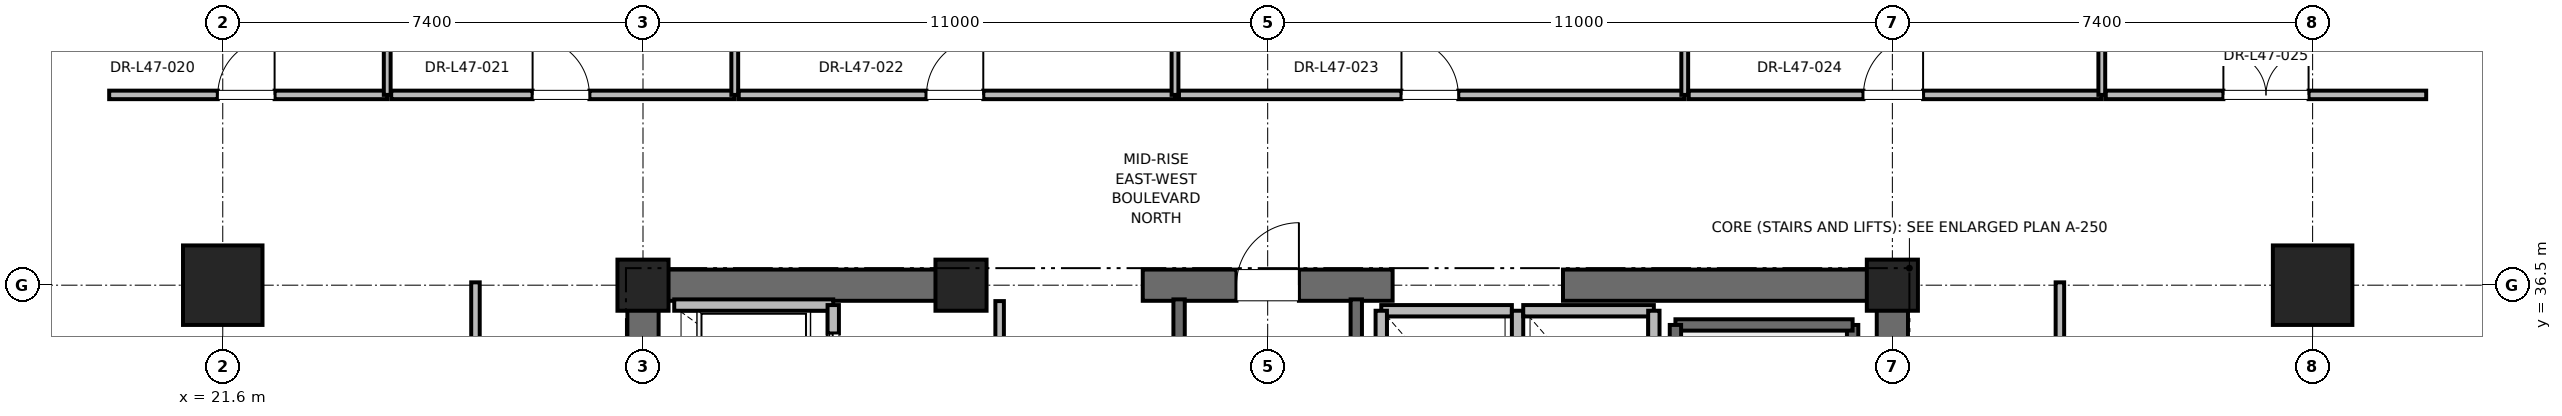
"""IFC4 building model, lengths in metres.
Left out: names, types, materials, properties, quantities, classifications, styles, units other than length and angle.
Written with IfcOpenShell. Run it as: python <this file> out.ifc"""

import sys

from ifc_helpers import new_model, si_unit, direction, frame, frame_2d, origin, origin_2d, place, context, subcontext, project, spatial, rectangle, extrude, element, fill, save


model = new_model("IFC4")
c1 = context("Model", 3, precision=1e-05, world=origin(), true_north=direction((0.0, 1.0)))
c2 = subcontext(c1, "Body", "Model", "MODEL_VIEW")
j1 = project(units=[si_unit("LENGTHUNIT", "METRE"), si_unit("PLANEANGLEUNIT", "RADIAN")], contexts=[c1])
p1 = place(None, origin())
s1 = spatial("IfcSite", under=j1, at=p1, CompositionType="ELEMENT")
p2 = place(p1, origin())
s2 = spatial("IfcBuilding", under=s1, at=p2, CompositionType="ELEMENT")
p3 = place(p2, frame((0.0, 0.0, 205.2)))
s3 = spatial("IfcBuildingStorey", under=s2, at=p3, CompositionType="ELEMENT", Elevation=205.2)
for number, where, z_axis, x_axis in (
    (1, (21.6, 36.5, 0.0), (0.0, 0.0, 1.0), (1.0, 0.0, 0.0)),
    (2, (58.4, 36.5, 0.0), (0.0, 0.0, 1.0), (1.0, 0.0, 0.0)),
):
    element("IfcColumn", number, at=place(p3, frame(where, z_axis=z_axis, x_axis=x_axis)), inside=s3, PredefinedType="COLUMN", context=c2, shape_type="SweptSolid", body=[
        extrude(rectangle(XDim=1.4, YDim=1.4, at=origin_2d()), origin(), (0.0, 0.0, 1.0), 4.0),
    ])
for number, where, z_axis, x_axis in (
    (3, (29.0, 36.5, 0.0), (0.0, 0.0, 1.0), (1.0, 0.0, 0.0)),
    (4, (51.0, 36.5, 0.0), (0.0, 0.0, 1.0), (1.0, 0.0, 0.0)),
    (5, (34.6, 36.5, 0.0), (0.0, 0.0, 1.0), (1.0, 0.0, 0.0)),
):
    element("IfcColumn", number, at=place(p3, frame(where, z_axis=z_axis, x_axis=x_axis)), inside=s3, PredefinedType="PILASTER", context=c2, shape_type="SweptSolid", body=[
        extrude(rectangle(XDim=0.9, YDim=0.9, at=origin_2d()), origin(), (0.0, 0.0, 1.0), 4.0),
    ])
p4 = place(p3, frame((29.0, 36.5, 0.0), z_axis=(0.0, 0.0, 1.0), x_axis=(1.0, 0.0, 0.0)))
e6 = element("IfcWall", 6, at=p4, inside=s3, PredefinedType="SHEAR", context=c2, shape_type="SweptSolid", body=[
    extrude(rectangle(XDim=5.8, YDim=0.55, at=frame_2d((2.9, 0.0))), origin(), (0.0, 0.0, 1.0), 3.775),
])
p5 = place(p3, frame((37.8, 36.5, 0.0), z_axis=(0.0, 0.0, 1.0), x_axis=(1.0, 0.0, 0.0)))
e7 = element("IfcWall", 7, at=p5, inside=s3, PredefinedType="SHEAR", context=c2, shape_type="SweptSolid", body=[
    extrude(rectangle(XDim=4.4, YDim=0.55, at=frame_2d((2.2, 0.0))), origin(), (0.0, 0.0, 1.0), 3.775),
])
p6 = place(p5, frame((1.65, 0.0, 0.0)))
e8 = element("IfcOpeningElement", 8, at=p6, cuts=e7, PredefinedType="OPENING", context=c2, shape_type="SweptSolid", body=[
    extrude(rectangle(XDim=1.1, YDim=2.15, at=frame_2d((0.55, 1.075))), frame((0.0, 0.275, 0.0), z_axis=(0.0, -1.0, 0.0), x_axis=(1.0, 0.0, 0.0)), (0.0, 0.0, 1.0), 0.55),
])
for number, where, z_axis, x_axis in (
    (9, (45.2, 36.5, 0.0), (0.0, 0.0, 1.0), (1.0, 0.0, 0.0)),
    (10, (29.0, 30.7, 0.0), (0.0, 0.0, 1.0), (0.0, 1.0, 0.0)),
):
    element("IfcWall", number, at=place(p3, frame(where, z_axis=z_axis, x_axis=x_axis)), inside=s3, PredefinedType="SHEAR", context=c2, shape_type="SweptSolid", body=[
        extrude(rectangle(XDim=5.8, YDim=0.55, at=frame_2d((2.9, 0.0))), origin(), (0.0, 0.0, 1.0), 3.775),
    ])
p7 = place(p3, frame((51.0, 27.7, 0.0), z_axis=(0.0, 0.0, 1.0), x_axis=(0.0, 1.0, 0.0)))
e11 = element("IfcWall", 11, at=p7, inside=s3, PredefinedType="SHEAR", context=c2, shape_type="SweptSolid", body=[
    extrude(rectangle(XDim=8.8, YDim=0.55, at=frame_2d((4.4, 0.0))), origin(), (0.0, 0.0, 1.0), 3.775),
])
p8 = place(p3, frame((50.3, 27.65, 0.0), z_axis=(0.0, 0.0, 1.0), x_axis=(0.0, 1.0, 0.0)))
e12 = element("IfcWall", 12, at=p8, inside=s3, PredefinedType="SOLIDWALL", context=c2, shape_type="SweptSolid", body=[
    extrude(rectangle(XDim=8.15, YDim=0.2, at=frame_2d((4.075, 0.0))), origin(), (0.0, 0.0, 1.0), 3.775),
])
p9 = place(p3, frame((47.18, 35.8, 0.0), z_axis=(0.0, 0.0, 1.0), x_axis=(1.0, 0.0, 0.0)))
e13 = element("IfcWall", 13, at=p9, inside=s3, PredefinedType="SOLIDWALL", context=c2, shape_type="SweptSolid", body=[
    extrude(rectangle(XDim=3.12, YDim=0.2, at=frame_2d((1.56, 0.0))), origin(), (0.0, 0.0, 1.0), 3.775),
])
p10 = place(p3, frame((47.18, 27.62, 0.0), z_axis=(0.0, 0.0, 1.0), x_axis=(0.0, 1.0, 0.0)))
e14 = element("IfcWall", 14, at=p10, inside=s3, PredefinedType="SOLIDWALL", context=c2, shape_type="SweptSolid", body=[
    extrude(rectangle(XDim=8.18, YDim=0.2, at=frame_2d((4.09, 0.0))), origin(), (0.0, 0.0, 1.0), 3.775),
])
p11 = place(p3, frame((38.44, 27.38, 0.0), z_axis=(0.0, 0.0, 1.0), x_axis=(0.0, 1.0, 0.0)))
e15 = element("IfcWall", 15, at=p11, inside=s3, PredefinedType="SOLIDWALL", context=c2, shape_type="SweptSolid", body=[
    extrude(rectangle(XDim=8.87, YDim=0.2, at=frame_2d((4.435, 0.0))), origin(), (0.0, 0.0, 1.0), 3.775),
])
p12 = place(p3, frame((41.56, 27.68, 0.0), z_axis=(0.0, 0.0, 1.0), x_axis=(0.0, 1.0, 0.0)))
e16 = element("IfcWall", 16, at=p12, inside=s3, PredefinedType="SOLIDWALL", context=c2, shape_type="SweptSolid", body=[
    extrude(rectangle(XDim=8.57, YDim=0.2, at=frame_2d((4.285, 0.0))), origin(), (0.0, 0.0, 1.0), 3.775),
])
p13 = place(p3, frame((32.35, 36.15, 0.0), z_axis=(0.0, 0.0, 1.0), x_axis=(-1.0, 0.0, 0.0)))
e17 = element("IfcWall", 17, at=p13, inside=s3, PredefinedType="SOLIDWALL", context=c2, shape_type="SweptSolid", body=[
    extrude(rectangle(XDim=2.8, YDim=0.2, at=frame_2d((1.4, 0.0))), origin(), (0.0, 0.0, 1.0), 3.062),
])
p14 = place(p3, frame((32.35, 34.05, 0.0), z_axis=(0.0, 0.0, 1.0), x_axis=(0.0, 1.0, 0.0)))
e18 = element("IfcWall", 18, at=p14, inside=s3, PredefinedType="SOLIDWALL", context=c2, shape_type="SweptSolid", body=[
    extrude(rectangle(XDim=2.1, YDim=0.2, at=frame_2d((1.05, 0.0))), origin(), (0.0, 0.0, 1.0), 3.775),
])
p15 = place(p14, frame((0.5, 0.0, 0.0)))
e19 = element("IfcOpeningElement", 19, at=p15, cuts=e18, PredefinedType="OPENING", context=c2, shape_type="SweptSolid", body=[
    extrude(rectangle(XDim=1.1, YDim=2.2, at=frame_2d((0.55, 1.1))), frame((0.0, 0.1, 0.0), z_axis=(0.0, -1.0, 0.0), x_axis=(1.0, 0.0, 0.0)), (0.0, 0.0, 1.0), 0.2),
])
p16 = place(p3, frame((44.3, 36.05, 0.0), z_axis=(0.0, 0.0, 1.0), x_axis=(-1.0, 0.0, 0.0)))
e20 = element("IfcWall", 20, at=p16, inside=s3, PredefinedType="SOLIDWALL", context=c2, shape_type="SweptSolid", body=[
    extrude(rectangle(XDim=2.3, YDim=0.2, at=frame_2d((1.15, 0.0))), origin(), (0.0, 0.0, 1.0), 2.755),
])
for number, where, z_axis, x_axis in (
    (21, (42.0, 36.05, 0.0), (0.0, 0.0, 1.0), (0.0, -1.0, 0.0)),
    (22, (44.4, 33.45, 0.0), (0.0, 0.0, 1.0), (0.0, 1.0, 0.0)),
):
    element("IfcWall", number, at=place(p3, frame(where, z_axis=z_axis, x_axis=x_axis)), inside=s3, PredefinedType="SOLIDWALL", context=c2, shape_type="SweptSolid", body=[
        extrude(rectangle(XDim=2.6, YDim=0.2, at=frame_2d((1.3, 0.0))), origin(), (0.0, 0.0, 1.0), 2.755),
    ])
p17 = place(p3, frame((46.8, 36.05, 0.0), z_axis=(0.0, 0.0, 1.0), x_axis=(-1.0, 0.0, 0.0)))
e23 = element("IfcWall", 23, at=p17, inside=s3, PredefinedType="SOLIDWALL", context=c2, shape_type="SweptSolid", body=[
    extrude(rectangle(XDim=2.3, YDim=0.2, at=frame_2d((1.15, 0.0))), origin(), (0.0, 0.0, 1.0), 2.755),
])
p18 = place(p3, frame((46.8, 33.45, 0.0), z_axis=(0.0, 0.0, 1.0), x_axis=(0.0, 1.0, 0.0)))
e24 = element("IfcWall", 24, at=p18, inside=s3, PredefinedType="SOLIDWALL", context=c2, shape_type="SweptSolid", body=[
    extrude(rectangle(XDim=2.6, YDim=0.2, at=frame_2d((1.3, 0.0))), origin(), (0.0, 0.0, 1.0), 3.775),
])
p19 = place(p3, frame((35.28, 33.95, 0.0), z_axis=(0.0, 0.0, 1.0), x_axis=(0.0, 1.0, 0.0)))
e25 = element("IfcWall", 25, at=p19, inside=s3, PredefinedType="PARTITIONING", context=c2, shape_type="SweptSolid", body=[
    extrude(rectangle(XDim=2.27, YDim=0.15, at=frame_2d((1.135, 0.0))), origin(), (0.0, 0.0, 1.0), 2.755),
])
p20 = place(p19, frame((0.66, 0.0, 0.0)))
e26 = element("IfcOpeningElement", 26, at=p20, cuts=e25, PredefinedType="OPENING", context=c2, shape_type="SweptSolid", body=[
    extrude(rectangle(XDim=0.95, YDim=2.15, at=frame_2d((0.475, 1.075))), frame((0.0, 0.075, 0.0), z_axis=(0.0, -1.0, 0.0), x_axis=(1.0, 0.0, 0.0)), (0.0, 0.0, 1.0), 0.15),
])
p21 = place(p3, frame((19.6, 39.85, 0.0), z_axis=(0.0, 0.0, 1.0), x_axis=(1.0, 0.0, 0.0)))
e27 = element("IfcWall", 27, at=p21, inside=s3, PredefinedType="PARTITIONING", context=c2, shape_type="SweptSolid", body=[
    extrude(rectangle(XDim=4.896, YDim=0.15, at=frame_2d((2.448, 0.0))), origin(), (0.0, 0.0, 1.0), 2.85),
])
p22 = place(p21, frame((1.913, 0.0, 0.0)))
e28 = element("IfcOpeningElement", 28, at=p22, cuts=e27, PredefinedType="OPENING", context=c2, shape_type="SweptSolid", body=[
    extrude(rectangle(XDim=1.0, YDim=2.15, at=frame_2d((0.5, 1.075))), frame((0.0, 0.075, 0.0), z_axis=(0.0, -1.0, 0.0), x_axis=(1.0, 0.0, 0.0)), (0.0, 0.0, 1.0), 0.15),
])
p23 = place(p3, frame((24.496, 39.85, 0.0), z_axis=(0.0, 0.0, 1.0), x_axis=(0.0, 1.0, 0.0)))
e29 = element("IfcWall", 29, at=p23, inside=s3, PredefinedType="PARTITIONING", context=c2, shape_type="SweptSolid", body=[
    extrude(rectangle(XDim=9.15, YDim=0.12, at=frame_2d((4.575, 0.0))), origin(), (0.0, 0.0, 1.0), 2.85),
])
p24 = place(p3, frame((24.566, 39.85, 0.0), z_axis=(0.0, 0.0, 1.0), x_axis=(1.0, 0.0, 0.0)))
e30 = element("IfcWall", 30, at=p24, inside=s3, PredefinedType="PARTITIONING", context=c2, shape_type="SweptSolid", body=[
    extrude(rectangle(XDim=6.05, YDim=0.15, at=frame_2d((3.025, 0.0))), origin(), (0.0, 0.0, 1.0), 2.85),
])
p25 = place(p24, frame((2.49, 0.0, 0.0)))
e31 = element("IfcOpeningElement", 31, at=p25, cuts=e30, PredefinedType="OPENING", context=c2, shape_type="SweptSolid", body=[
    extrude(rectangle(XDim=1.0, YDim=2.15, at=frame_2d((0.5, 1.075))), frame((0.0, 0.075, 0.0), z_axis=(0.0, -1.0, 0.0), x_axis=(1.0, 0.0, 0.0)), (0.0, 0.0, 1.0), 0.15),
])
p26 = place(p3, frame((30.616, 39.85, 0.0), z_axis=(0.0, 0.0, 1.0), x_axis=(0.0, 1.0, 0.0)))
e32 = element("IfcWall", 32, at=p26, inside=s3, PredefinedType="PARTITIONING", context=c2, shape_type="SweptSolid", body=[
    extrude(rectangle(XDim=9.15, YDim=0.12, at=frame_2d((4.575, 0.0))), origin(), (0.0, 0.0, 1.0), 2.405),
])
p27 = place(p3, frame((30.686, 39.85, 0.0), z_axis=(0.0, 0.0, 1.0), x_axis=(1.0, 0.0, 0.0)))
e33 = element("IfcWall", 33, at=p27, inside=s3, PredefinedType="PARTITIONING", context=c2, shape_type="SweptSolid", body=[
    extrude(rectangle(XDim=7.682, YDim=0.15, at=frame_2d((3.841, 0.0))), origin(), (0.0, 0.0, 1.0), 2.85),
])
p28 = place(p27, frame((3.306, 0.0, 0.0)))
e34 = element("IfcOpeningElement", 34, at=p28, cuts=e33, PredefinedType="OPENING", context=c2, shape_type="SweptSolid", body=[
    extrude(rectangle(XDim=1.0, YDim=2.15, at=frame_2d((0.5, 1.075))), frame((0.0, 0.075, 0.0), z_axis=(0.0, -1.0, 0.0), x_axis=(1.0, 0.0, 0.0)), (0.0, 0.0, 1.0), 0.15),
])
p29 = place(p3, frame((38.368, 39.85, 0.0), z_axis=(0.0, 0.0, 1.0), x_axis=(0.0, 1.0, 0.0)))
e35 = element("IfcWall", 35, at=p29, inside=s3, PredefinedType="PARTITIONING", context=c2, shape_type="SweptSolid", body=[
    extrude(rectangle(XDim=9.15, YDim=0.12, at=frame_2d((4.575, 0.0))), origin(), (0.0, 0.0, 1.0), 2.405),
])
p30 = place(p3, frame((38.438, 39.85, 0.0), z_axis=(0.0, 0.0, 1.0), x_axis=(1.0, 0.0, 0.0)))
e36 = element("IfcWall", 36, at=p30, inside=s3, PredefinedType="PARTITIONING", context=c2, shape_type="SweptSolid", body=[
    extrude(rectangle(XDim=8.906, YDim=0.15, at=frame_2d((4.453, 0.0))), origin(), (0.0, 0.0, 1.0), 2.85),
])
p31 = place(p30, frame((3.918, 0.0, 0.0)))
e37 = element("IfcOpeningElement", 37, at=p31, cuts=e36, PredefinedType="OPENING", context=c2, shape_type="SweptSolid", body=[
    extrude(rectangle(XDim=1.0, YDim=2.15, at=frame_2d((0.5, 1.075))), frame((0.0, 0.075, 0.0), z_axis=(0.0, -1.0, 0.0), x_axis=(1.0, 0.0, 0.0)), (0.0, 0.0, 1.0), 0.15),
])
p32 = place(p3, frame((47.344, 39.85, 0.0), z_axis=(0.0, 0.0, 1.0), x_axis=(0.0, 1.0, 0.0)))
e38 = element("IfcWall", 38, at=p32, inside=s3, PredefinedType="PARTITIONING", context=c2, shape_type="SweptSolid", body=[
    extrude(rectangle(XDim=9.15, YDim=0.12, at=frame_2d((4.575, 0.0))), origin(), (0.0, 0.0, 1.0), 2.405),
])
p33 = place(p3, frame((47.414, 39.85, 0.0), z_axis=(0.0, 0.0, 1.0), x_axis=(1.0, 0.0, 0.0)))
e39 = element("IfcWall", 39, at=p33, inside=s3, PredefinedType="PARTITIONING", context=c2, shape_type="SweptSolid", body=[
    extrude(rectangle(XDim=7.274, YDim=0.15, at=frame_2d((3.637, 0.0))), origin(), (0.0, 0.0, 1.0), 2.85),
])
p34 = place(p33, frame((3.077, 0.0, 0.0)))
e40 = element("IfcOpeningElement", 40, at=p34, cuts=e39, PredefinedType="OPENING", context=c2, shape_type="SweptSolid", body=[
    extrude(rectangle(XDim=1.05, YDim=2.2, at=frame_2d((0.525, 1.1))), frame((0.0, 0.075, 0.0), z_axis=(0.0, -1.0, 0.0), x_axis=(1.0, 0.0, 0.0)), (0.0, 0.0, 1.0), 0.15),
])
p35 = place(p3, frame((54.688, 39.85, 0.0), z_axis=(0.0, 0.0, 1.0), x_axis=(0.0, 1.0, 0.0)))
e41 = element("IfcWall", 41, at=p35, inside=s3, PredefinedType="PARTITIONING", context=c2, shape_type="SweptSolid", body=[
    extrude(rectangle(XDim=9.15, YDim=0.12, at=frame_2d((4.575, 0.0))), origin(), (0.0, 0.0, 1.0), 2.85),
])
p36 = place(p3, frame((54.758, 39.85, 0.0), z_axis=(0.0, 0.0, 1.0), x_axis=(1.0, 0.0, 0.0)))
e42 = element("IfcWall", 42, at=p36, inside=s3, PredefinedType="PARTITIONING", context=c2, shape_type="SweptSolid", body=[
    extrude(rectangle(XDim=5.642, YDim=0.15, at=frame_2d((2.821, 0.0))), origin(), (0.0, 0.0, 1.0), 2.85),
])
p37 = place(p36, frame((2.071, 0.0, 0.0)))
e43 = element("IfcOpeningElement", 43, at=p37, cuts=e42, PredefinedType="OPENING", context=c2, shape_type="SweptSolid", body=[
    extrude(rectangle(XDim=1.5, YDim=2.25, at=frame_2d((0.75, 1.125))), frame((0.0, 0.075, 0.0), z_axis=(0.0, -1.0, 0.0), x_axis=(1.0, 0.0, 0.0)), (0.0, 0.0, 1.0), 0.15),
])
p38 = place(p3, frame((26.05, 30.647, 0.0), z_axis=(0.0, 0.0, 1.0), x_axis=(0.0, 1.0, 0.0)))
e44 = element("IfcWall", 44, at=p38, inside=s3, PredefinedType="PARTITIONING", context=c2, shape_type="SweptSolid", body=[
    extrude(rectangle(XDim=5.903, YDim=0.15, at=frame_2d((2.952, 0.0))), origin(), (0.0, 0.0, 1.0), 2.85),
])
p39 = place(p38, frame((2.126, 0.0, 0.0)))
e45 = element("IfcOpeningElement", 45, at=p39, cuts=e44, PredefinedType="OPENING", context=c2, shape_type="SweptSolid", body=[
    extrude(rectangle(XDim=1.5, YDim=2.25, at=frame_2d((0.75, 1.125))), frame((0.0, 0.075, 0.0), z_axis=(0.0, -1.0, 0.0), x_axis=(1.0, 0.0, 0.0)), (0.0, 0.0, 1.0), 0.15),
])
p40 = place(p3, frame((53.95, 32.819, 0.0), z_axis=(0.0, 0.0, 1.0), x_axis=(0.0, 1.0, 0.0)))
e46 = element("IfcWall", 46, at=p40, inside=s3, PredefinedType="PARTITIONING", context=c2, shape_type="SweptSolid", body=[
    extrude(rectangle(XDim=3.731, YDim=0.15, at=frame_2d((1.865, 0.0))), origin(), (0.0, 0.0, 1.0), 2.85),
])
p41 = place(p40, frame((1.291, 0.0, 0.0)))
e47 = element("IfcOpeningElement", 47, at=p41, cuts=e46, PredefinedType="OPENING", context=c2, shape_type="SweptSolid", body=[
    extrude(rectangle(XDim=1.0, YDim=2.15, at=frame_2d((0.5, 1.075))), frame((0.0, 0.075, 0.0), z_axis=(0.0, -1.0, 0.0), x_axis=(1.0, 0.0, 0.0)), (0.0, 0.0, 1.0), 0.15),
])
p42 = place(p6, origin())
e48 = element("IfcDoor", 48, at=p42, inside=s3, OperationType="SINGLE_SWING_RIGHT", PredefinedType="DOOR", context=c2, shape_type="SweptSolid", body=[
    extrude(rectangle(XDim=1.1, YDim=2.15, at=frame_2d((0.55, 1.075))), frame((0.0, 0.025, 0.0), z_axis=(0.0, -1.0, 0.0), x_axis=(1.0, 0.0, 0.0)), (0.0, 0.0, 1.0), 0.05),
])
fill(e8, e48)
p43 = place(p15, origin())
e49 = element("IfcDoor", 49, at=p43, inside=s3, OperationType="SLIDING_TO_RIGHT", PredefinedType="DOOR", context=c2, shape_type="SweptSolid", body=[
    extrude(rectangle(XDim=1.1, YDim=2.2, at=frame_2d((0.55, 1.1))), frame((0.0, 0.025, 0.0), z_axis=(0.0, -1.0, 0.0), x_axis=(1.0, 0.0, 0.0)), (0.0, 0.0, 1.0), 0.05),
])
fill(e19, e49)
p44 = place(p22, origin())
e50 = element("IfcDoor", 50, at=p44, inside=s3, OperationType="SINGLE_SWING_RIGHT", PredefinedType="DOOR", context=c2, shape_type="SweptSolid", body=[
    extrude(rectangle(XDim=1.0, YDim=2.15, at=frame_2d((0.5, 1.075))), frame((0.0, 0.025, 0.0), z_axis=(0.0, -1.0, 0.0), x_axis=(1.0, 0.0, 0.0)), (0.0, 0.0, 1.0), 0.05),
])
fill(e28, e50)
p45 = place(p25, origin())
e51 = element("IfcDoor", 51, at=p45, inside=s3, OperationType="SINGLE_SWING_LEFT", PredefinedType="DOOR", context=c2, shape_type="SweptSolid", body=[
    extrude(rectangle(XDim=1.0, YDim=2.15, at=frame_2d((0.5, 1.075))), frame((0.0, 0.025, 0.0), z_axis=(0.0, -1.0, 0.0), x_axis=(1.0, 0.0, 0.0)), (0.0, 0.0, 1.0), 0.05),
])
fill(e31, e51)
p46 = place(p28, origin())
e52 = element("IfcDoor", 52, at=p46, inside=s3, OperationType="SINGLE_SWING_RIGHT", PredefinedType="DOOR", context=c2, shape_type="SweptSolid", body=[
    extrude(rectangle(XDim=1.0, YDim=2.15, at=frame_2d((0.5, 1.075))), frame((0.0, 0.025, 0.0), z_axis=(0.0, -1.0, 0.0), x_axis=(1.0, 0.0, 0.0)), (0.0, 0.0, 1.0), 0.05),
])
fill(e34, e52)
p47 = place(p31, origin())
e53 = element("IfcDoor", 53, at=p47, inside=s3, OperationType="SINGLE_SWING_LEFT", PredefinedType="DOOR", context=c2, shape_type="SweptSolid", body=[
    extrude(rectangle(XDim=1.0, YDim=2.15, at=frame_2d((0.5, 1.075))), frame((0.0, 0.025, 0.0), z_axis=(0.0, -1.0, 0.0), x_axis=(1.0, 0.0, 0.0)), (0.0, 0.0, 1.0), 0.05),
])
fill(e37, e53)
p48 = place(p34, origin())
e54 = element("IfcDoor", 54, at=p48, inside=s3, OperationType="SINGLE_SWING_RIGHT", PredefinedType="DOOR", context=c2, shape_type="SweptSolid", body=[
    extrude(rectangle(XDim=1.05, YDim=2.2, at=frame_2d((0.525, 1.1))), frame((0.0, 0.025, 0.0), z_axis=(0.0, -1.0, 0.0), x_axis=(1.0, 0.0, 0.0)), (0.0, 0.0, 1.0), 0.05),
])
fill(e40, e54)
p49 = place(p37, origin())
e55 = element("IfcDoor", 55, at=p49, inside=s3, OperationType="DOUBLE_DOOR_SINGLE_SWING", PredefinedType="DOOR", context=c2, shape_type="SweptSolid", body=[
    extrude(rectangle(XDim=1.5, YDim=2.25, at=frame_2d((0.75, 1.125))), frame((0.0, 0.025, 0.0), z_axis=(0.0, -1.0, 0.0), x_axis=(1.0, 0.0, 0.0)), (0.0, 0.0, 1.0), 0.05),
])
fill(e43, e55)
save(model, sys.argv[1])
